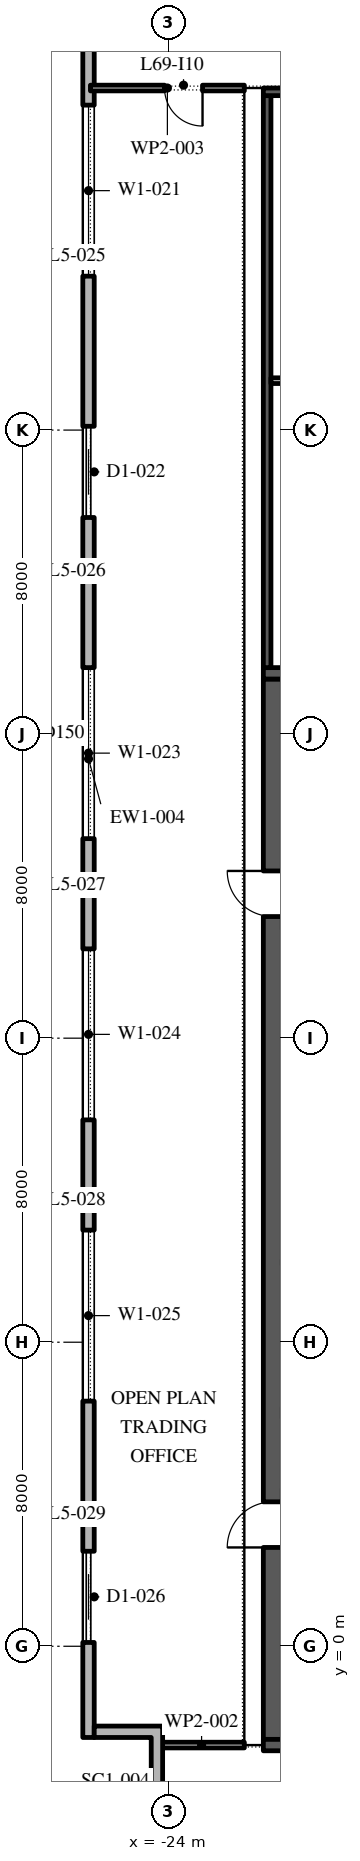
"""IFC4 building model, lengths in metres.
Left out: names, types, materials, properties, quantities, classifications, styles, units other than length and angle.
Written with IfcOpenShell. Run it as: python <this file> out.ifc"""

import sys

from ifc_helpers import new_model, si_unit, direction, frame, frame_2d, origin, place, context, subcontext, project, spatial, polyline, rectangle, outline, extrude, element, fill, save


model = new_model("IFC4")
c1 = context("Model", 3, precision=1e-05, world=origin(), true_north=direction((0.0, 1.0)))
c2 = subcontext(c1, "Body", "Model", "MODEL_VIEW")
j1 = project(units=[si_unit("LENGTHUNIT", "METRE"), si_unit("PLANEANGLEUNIT", "RADIAN")], contexts=[c1])
p1 = place(None, origin())
s1 = spatial("IfcSite", under=j1, at=p1, CompositionType="ELEMENT")
p2 = place(p1, origin())
s2 = spatial("IfcBuilding", under=s1, at=p2, CompositionType="ELEMENT")
p3 = place(p2, frame((0.0, 0.0, 317.4)))
s3 = spatial("IfcBuildingStorey", under=s2, at=p3, CompositionType="ELEMENT", Elevation=317.4)
p4 = place(p3, frame((-26.1, 49.1, 0.0), z_axis=(0.0, 0.0, 1.0), x_axis=(0.0, -1.0, 0.0)))
e1 = element("IfcWall", 1, at=p4, inside=s3, PredefinedType="STANDARD", context=c2, shape_type="SweptSolid", body=[
    extrude(rectangle(XDim=51.5, YDim=0.3, at=frame_2d((25.75, 0.0))), origin(), (0.0, 0.0, 1.0), 4.0),
])
p5 = place(p4, frame((1.3, 0.0, 0.45)))
e2 = element("IfcOpeningElement", 2, at=p5, cuts=e1, PredefinedType="OPENING", context=c2, shape_type="SweptSolid", body=[
    extrude(rectangle(XDim=4.5, YDim=3.05, at=frame_2d((2.25, 1.525))), frame((0.0, 0.16, 0.0), z_axis=(0.0, -1.0, 0.0), x_axis=(1.0, 0.0, 0.0)), (0.0, 0.0, 1.0), 0.32),
])
p6 = place(p4, frame((8.55, 0.0, 0.45)))
e3 = element("IfcOpeningElement", 3, at=p6, cuts=e1, PredefinedType="OPENING", context=c2, shape_type="SweptSolid", body=[
    extrude(rectangle(XDim=4.5, YDim=3.05, at=frame_2d((2.25, 1.525))), frame((0.0, 0.16, 0.0), z_axis=(0.0, -1.0, 0.0), x_axis=(1.0, 0.0, 0.0)), (0.0, 0.0, 1.0), 0.32),
])
p7 = place(p4, frame((17.0, 0.0, 0.0)))
e4 = element("IfcOpeningElement", 4, at=p7, cuts=e1, PredefinedType="OPENING", context=c2, shape_type="SweptSolid", body=[
    extrude(rectangle(XDim=2.4, YDim=3.5, at=frame_2d((1.2, 1.75))), frame((0.0, 0.16, 0.0), z_axis=(0.0, -1.0, 0.0), x_axis=(1.0, 0.0, 0.0)), (0.0, 0.0, 1.0), 0.32),
])
p8 = place(p4, frame((23.35, 0.0, 0.45)))
e5 = element("IfcOpeningElement", 5, at=p8, cuts=e1, PredefinedType="OPENING", context=c2, shape_type="SweptSolid", body=[
    extrude(rectangle(XDim=4.5, YDim=3.05, at=frame_2d((2.25, 1.525))), frame((0.0, 0.16, 0.0), z_axis=(0.0, -1.0, 0.0), x_axis=(1.0, 0.0, 0.0)), (0.0, 0.0, 1.0), 0.32),
])
p9 = place(p4, frame((30.75, 0.0, 0.45)))
e6 = element("IfcOpeningElement", 6, at=p9, cuts=e1, PredefinedType="OPENING", context=c2, shape_type="SweptSolid", body=[
    extrude(rectangle(XDim=4.5, YDim=3.05, at=frame_2d((2.25, 1.525))), frame((0.0, 0.16, 0.0), z_axis=(0.0, -1.0, 0.0), x_axis=(1.0, 0.0, 0.0)), (0.0, 0.0, 1.0), 0.32),
])
p10 = place(p4, frame((38.15, 0.0, 0.45)))
e7 = element("IfcOpeningElement", 7, at=p10, cuts=e1, PredefinedType="OPENING", context=c2, shape_type="SweptSolid", body=[
    extrude(rectangle(XDim=4.5, YDim=3.05, at=frame_2d((2.25, 1.525))), frame((0.0, 0.16, 0.0), z_axis=(0.0, -1.0, 0.0), x_axis=(1.0, 0.0, 0.0)), (0.0, 0.0, 1.0), 0.32),
])
p11 = place(p4, frame((46.6, 0.0, 0.0)))
e8 = element("IfcOpeningElement", 8, at=p11, cuts=e1, PredefinedType="OPENING", context=c2, shape_type="SweptSolid", body=[
    extrude(rectangle(XDim=2.4, YDim=3.5, at=frame_2d((1.2, 1.75))), frame((0.0, 0.16, 0.0), z_axis=(0.0, -1.0, 0.0), x_axis=(1.0, 0.0, 0.0)), (0.0, 0.0, 1.0), 0.32),
])
p12 = place(p3, origin())
e9 = element("IfcWall", 9, at=p12, inside=s3, PredefinedType="STANDARD", context=c2, shape_type="SweptSolid", body=[
    extrude(outline(polyline([(-22.65, -4.2), (-24.45, -4.2), (-24.45, -2.4), (-25.95, -2.4), (-25.95, -2.1), (-24.15, -2.1), (-24.15, -3.9), (-22.35, -3.9), (-22.35, -6.0), (-22.65, -6.0), (-22.65, -4.2)])), origin(), (0.0, 0.0, 1.0), 4.0),
])
p13 = place(p3, frame((-21.25, -2.45, 0.0), z_axis=(0.0, 0.0, 1.0), x_axis=(0.0, 1.0, 0.0)))
e10 = element("IfcWall", 10, at=p13, inside=s3, PredefinedType="SHEAR", context=c2, shape_type="SweptSolid", body=[
    extrude(rectangle(XDim=27.9, YDim=0.5, at=frame_2d((13.95, 0.0))), origin(), (0.0, 0.0, 1.0), 4.0),
])
p14 = place(p13, frame((5.05, 0.0, 0.0)))
e11 = element("IfcOpeningElement", 11, at=p14, cuts=e10, PredefinedType="OPENING", context=c2, shape_type="SweptSolid", body=[
    extrude(rectangle(XDim=1.2, YDim=2.1, at=frame_2d((0.6, 1.05))), frame((0.0, 0.26, 0.0), z_axis=(0.0, -1.0, 0.0), x_axis=(1.0, 0.0, 0.0)), (0.0, 0.0, 1.0), 0.52),
])
p15 = place(p13, frame((21.65, 0.0, 0.0)))
e12 = element("IfcOpeningElement", 12, at=p15, cuts=e10, PredefinedType="OPENING", context=c2, shape_type="SweptSolid", body=[
    extrude(rectangle(XDim=1.2, YDim=2.1, at=frame_2d((0.6, 1.05))), frame((0.0, 0.26, 0.0), z_axis=(0.0, -1.0, 0.0), x_axis=(1.0, 0.0, 0.0)), (0.0, 0.0, 1.0), 0.52),
])
for number, where, z_axis, x_axis in (
    (13, (-21.5, -2.6, 0.0), (0.0, 0.0, 1.0), (1.0, 0.0, 0.0)),
    (14, (-21.5, 25.6, 0.0), (0.0, 0.0, 1.0), (1.0, 0.0, 0.0)),
):
    element("IfcWall", number, at=place(p3, frame(where, z_axis=z_axis, x_axis=x_axis)), inside=s3, PredefinedType="SHEAR", context=c2, shape_type="SweptSolid", body=[
        extrude(rectangle(XDim=11.0, YDim=0.3, at=frame_2d((5.5, 0.0))), origin(), (0.0, 0.0, 1.0), 4.0),
    ])
p16 = place(p3, frame((-21.4, 25.75, 0.0), z_axis=(0.0, 0.0, 1.0), x_axis=(0.0, 1.0, 0.0)))
e15 = element("IfcWall", 15, at=p16, inside=s3, PredefinedType="SHEAR", context=c2, shape_type="SweptSolid", body=[
    extrude(rectangle(XDim=15.05, YDim=0.2, at=frame_2d((7.525, 0.0))), origin(), (0.0, 0.0, 1.0), 4.0),
])
p17 = place(p3, frame((-21.5, 40.9, 0.0), z_axis=(0.0, 0.0, 1.0), x_axis=(1.0, 0.0, 0.0)))
e16 = element("IfcWall", 16, at=p17, inside=s3, PredefinedType="SHEAR", context=c2, shape_type="SweptSolid", body=[
    extrude(rectangle(XDim=11.0, YDim=0.2, at=frame_2d((5.5, 0.0))), origin(), (0.0, 0.0, 1.0), 4.0),
])
p18 = place(p3, frame((-21.3, 33.3, 0.0), z_axis=(0.0, 0.0, 1.0), x_axis=(1.0, 0.0, 0.0)))
e17 = element("IfcWall", 17, at=p18, inside=s3, PredefinedType="PARTITIONING", context=c2, shape_type="SweptSolid", body=[
    extrude(rectangle(XDim=10.6, YDim=0.15, at=frame_2d((5.3, 0.0))), origin(), (0.0, 0.0, 1.0), 4.0),
])
p19 = place(p3, frame((-24.25, -2.6, 0.0), z_axis=(0.0, 0.0, 1.0), x_axis=(1.0, 0.0, 0.0)))
e18 = element("IfcWall", 18, at=p19, inside=s3, PredefinedType="PARTITIONING", context=c2, shape_type="SweptSolid", body=[
    extrude(rectangle(XDim=2.25, YDim=0.15, at=frame_2d((1.125, 0.0))), origin(), (0.0, 0.0, 1.0), 4.0),
])
p20 = place(p3, frame((-22.0, 41.0, 0.0), z_axis=(0.0, 0.0, 1.0), x_axis=(-1.0, 0.0, 0.0)))
e19 = element("IfcWall", 19, at=p20, inside=s3, PredefinedType="PARTITIONING", context=c2, shape_type="SweptSolid", body=[
    extrude(rectangle(XDim=4.05, YDim=0.15, at=frame_2d((2.025, 0.0))), origin(), (0.0, 0.0, 1.0), 4.0),
])
p21 = place(p20, frame((1.1, 0.0, 0.0)))
e20 = element("IfcOpeningElement", 20, at=p21, cuts=e19, PredefinedType="OPENING", context=c2, shape_type="SweptSolid", body=[
    extrude(rectangle(XDim=1.0, YDim=2.1, at=frame_2d((0.5, 1.05))), frame((0.0, 0.085, 0.0), z_axis=(0.0, -1.0, 0.0), x_axis=(1.0, 0.0, 0.0)), (0.0, 0.0, 1.0), 0.17),
])
p22 = place(p6, origin())
e21 = element("IfcWindow", 21, at=p22, inside=s3, PartitioningType="DOUBLE_PANEL_VERTICAL", PredefinedType="WINDOW", context=c2, shape_type="SweptSolid", body=[
    extrude(rectangle(XDim=4.5, YDim=3.05, at=frame_2d((2.25, 1.525))), frame((0.0, 0.03, 0.0), z_axis=(0.0, -1.0, 0.0), x_axis=(1.0, 0.0, 0.0)), (0.0, 0.0, 1.0), 0.06),
])
fill(e3, e21)
p23 = place(p7, origin())
e22 = element("IfcDoor", 22, at=p23, inside=s3, OperationType="DOUBLE_DOOR_SLIDING", PredefinedType="DOOR", context=c2, shape_type="SweptSolid", body=[
    extrude(rectangle(XDim=2.4, YDim=3.5, at=frame_2d((1.2, 1.75))), frame((0.0, 0.025, 0.0), z_axis=(0.0, -1.0, 0.0), x_axis=(1.0, 0.0, 0.0)), (0.0, 0.0, 1.0), 0.05),
])
fill(e4, e22)
p24 = place(p8, origin())
e23 = element("IfcWindow", 23, at=p24, inside=s3, PartitioningType="DOUBLE_PANEL_VERTICAL", PredefinedType="WINDOW", context=c2, shape_type="SweptSolid", body=[
    extrude(rectangle(XDim=4.5, YDim=3.05, at=frame_2d((2.25, 1.525))), frame((0.0, 0.03, 0.0), z_axis=(0.0, -1.0, 0.0), x_axis=(1.0, 0.0, 0.0)), (0.0, 0.0, 1.0), 0.06),
])
fill(e5, e23)
p25 = place(p9, origin())
e24 = element("IfcWindow", 24, at=p25, inside=s3, PartitioningType="DOUBLE_PANEL_VERTICAL", PredefinedType="WINDOW", context=c2, shape_type="SweptSolid", body=[
    extrude(rectangle(XDim=4.5, YDim=3.05, at=frame_2d((2.25, 1.525))), frame((0.0, 0.03, 0.0), z_axis=(0.0, -1.0, 0.0), x_axis=(1.0, 0.0, 0.0)), (0.0, 0.0, 1.0), 0.06),
])
fill(e6, e24)
p26 = place(p10, origin())
e25 = element("IfcWindow", 25, at=p26, inside=s3, PartitioningType="DOUBLE_PANEL_VERTICAL", PredefinedType="WINDOW", context=c2, shape_type="SweptSolid", body=[
    extrude(rectangle(XDim=4.5, YDim=3.05, at=frame_2d((2.25, 1.525))), frame((0.0, 0.03, 0.0), z_axis=(0.0, -1.0, 0.0), x_axis=(1.0, 0.0, 0.0)), (0.0, 0.0, 1.0), 0.06),
])
fill(e7, e25)
p27 = place(p11, origin())
e26 = element("IfcDoor", 26, at=p27, inside=s3, OperationType="DOUBLE_DOOR_SLIDING", PredefinedType="DOOR", context=c2, shape_type="SweptSolid", body=[
    extrude(rectangle(XDim=2.4, YDim=3.5, at=frame_2d((1.2, 1.75))), frame((0.0, 0.025, 0.0), z_axis=(0.0, -1.0, 0.0), x_axis=(1.0, 0.0, 0.0)), (0.0, 0.0, 1.0), 0.05),
])
fill(e8, e26)
p28 = place(p14, origin())
e27 = element("IfcDoor", 27, at=p28, inside=s3, OperationType="SINGLE_SWING_RIGHT", PredefinedType="DOOR", context=c2, shape_type="SweptSolid", body=[
    extrude(rectangle(XDim=1.2, YDim=2.1, at=frame_2d((0.6, 1.05))), frame((0.0, 0.025, 0.0), z_axis=(0.0, -1.0, 0.0), x_axis=(1.0, 0.0, 0.0)), (0.0, 0.0, 1.0), 0.05),
])
fill(e11, e27)
p29 = place(p15, origin())
e28 = element("IfcDoor", 28, at=p29, inside=s3, OperationType="SINGLE_SWING_LEFT", PredefinedType="DOOR", context=c2, shape_type="SweptSolid", body=[
    extrude(rectangle(XDim=1.2, YDim=2.1, at=frame_2d((0.6, 1.05))), frame((0.0, 0.025, 0.0), z_axis=(0.0, -1.0, 0.0), x_axis=(1.0, 0.0, 0.0)), (0.0, 0.0, 1.0), 0.05),
])
fill(e12, e28)
p30 = place(p21, origin())
e29 = element("IfcDoor", 29, at=p30, inside=s3, OperationType="SINGLE_SWING_RIGHT", PredefinedType="DOOR", context=c2, shape_type="SweptSolid", body=[
    extrude(rectangle(XDim=1.0, YDim=2.1, at=frame_2d((0.5, 1.05))), frame((0.0, 0.025, 0.0), z_axis=(0.0, -1.0, 0.0), x_axis=(1.0, 0.0, 0.0)), (0.0, 0.0, 1.0), 0.05),
])
fill(e20, e29)
save(model, sys.argv[1])
